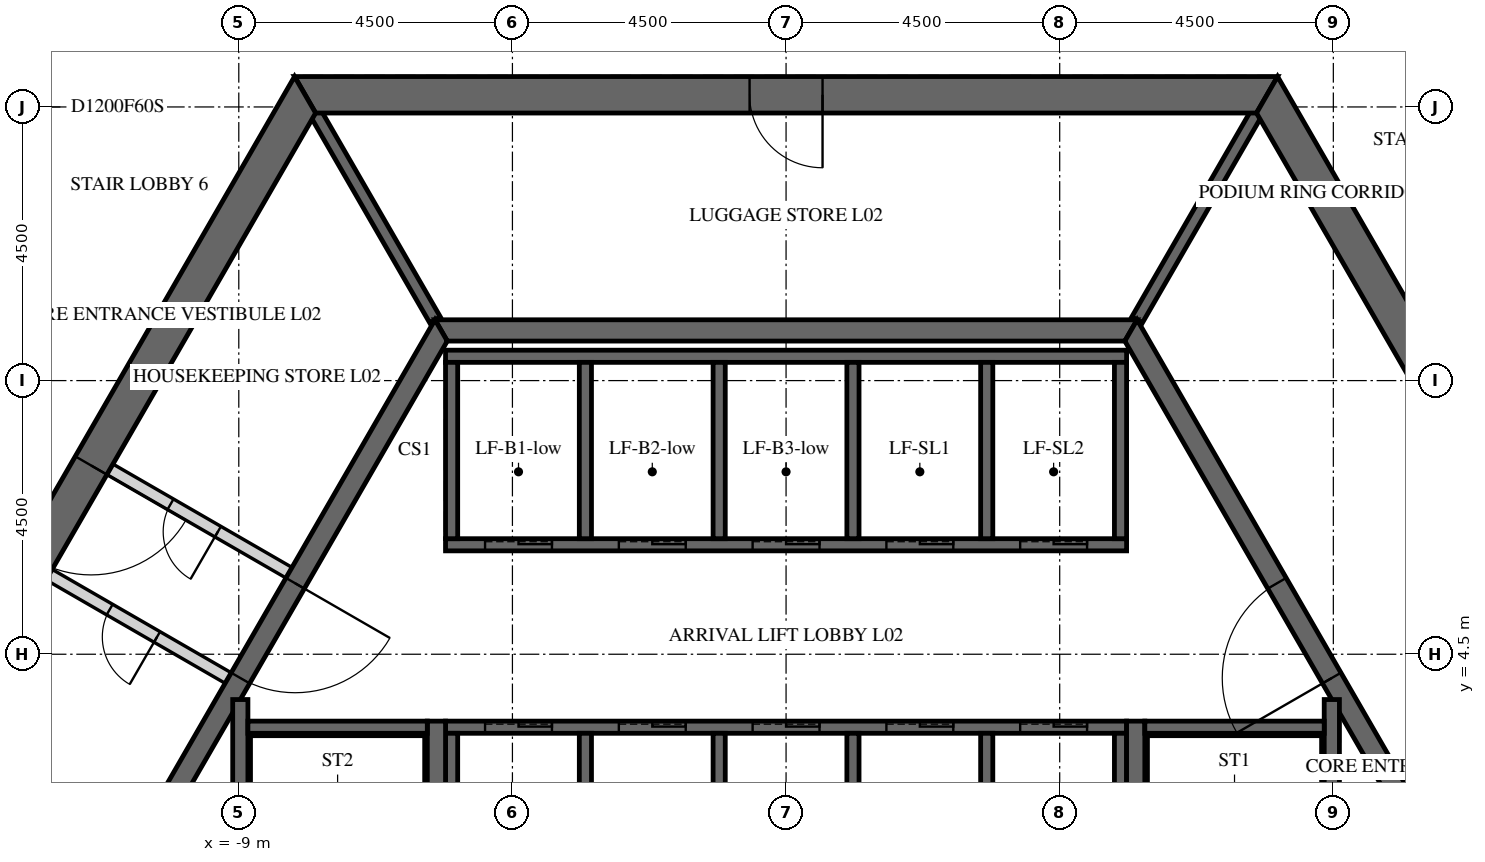
"""IFC4 building model, lengths in metres.
Left out: names, types, materials, properties, quantities, classifications, styles, units other than length and angle.
Written with IfcOpenShell. Run it as: python <this file> out.ifc"""

import sys

from ifc_helpers import new_model, si_unit, direction, frame, frame_2d, origin, place, context, subcontext, project, spatial, polyline, rectangle, outline, extrude, element, fill, save


model = new_model("IFC4")
c1 = context("Model", 3, precision=1e-05, world=origin(), true_north=direction((0.0, 1.0)))
c2 = subcontext(c1, "Body", "Model", "MODEL_VIEW")
j1 = project(units=[si_unit("LENGTHUNIT", "METRE"), si_unit("PLANEANGLEUNIT", "RADIAN")], contexts=[c1])
p1 = place(None, origin())
s1 = spatial("IfcSite", under=j1, at=p1, CompositionType="ELEMENT")
p2 = place(p1, origin())
s2 = spatial("IfcBuilding", under=s1, at=p2, CompositionType="ELEMENT")
p3 = place(p2, frame((0.0, 0.0, 15.0)))
s3 = spatial("IfcBuildingStorey", under=s2, at=p3, CompositionType="ELEMENT", Elevation=15.0)
p4 = place(p3, frame((-7.91, 13.7, -0.25), z_axis=(0.0, 0.0, 1.0), x_axis=(-0.499999880136, -0.866025472988, 0.0)))
e1 = element("IfcWall", 1, at=p4, inside=s3, PredefinedType="SHEAR", context=c2, shape_type="SweptSolid", body=[
    extrude(outline(polyline([(-0.173, -0.3), (15.993, -0.3), (15.646, 0.3), (0.173, 0.3), (-0.173, -0.3)])), origin(), (0.0, 0.0, 1.0), 5.5),
])
p5 = place(p4, frame((7.039, 0.0, 0.25)))
e2 = element("IfcOpeningElement", 2, at=p5, cuts=e1, PredefinedType="OPENING", context=c2, shape_type="SweptSolid", body=[
    extrude(rectangle(XDim=1.8, YDim=2.4, at=frame_2d((0.9, 1.2))), frame((0.0, 0.31, 0.0), z_axis=(0.0, -1.0, 0.0), x_axis=(1.0, 0.0, 0.0)), (0.0, 0.0, 1.0), 0.62),
])
p6 = place(p3, frame((15.819, 0.0, -0.25), z_axis=(0.0, 0.0, 1.0), x_axis=(-0.499999880136, 0.866025472988, 0.0)))
e3 = element("IfcWall", 3, at=p6, inside=s3, PredefinedType="SHEAR", context=c2, shape_type="SweptSolid", body=[
    extrude(outline(polyline([(-0.173, -0.3), (15.993, -0.3), (15.646, 0.3), (0.173, 0.3), (-0.173, -0.3)])), origin(), (0.0, 0.0, 1.0), 5.5),
])
p7 = place(p6, frame((6.981, 0.0, 0.25)))
e4 = element("IfcOpeningElement", 4, at=p7, cuts=e3, PredefinedType="OPENING", context=c2, shape_type="SweptSolid", body=[
    extrude(rectangle(XDim=1.8, YDim=2.4, at=frame_2d((0.9, 1.2))), frame((0.0, 0.31, 0.0), z_axis=(0.0, -1.0, 0.0), x_axis=(1.0, 0.0, 0.0)), (0.0, 0.0, 1.0), 0.62),
])
p8 = place(p3, frame((7.91, 13.7, -0.25), z_axis=(0.0, 0.0, 1.0), x_axis=(-1.0, 0.0, 0.0)))
e5 = element("IfcWall", 5, at=p8, inside=s3, PredefinedType="SHEAR", context=c2, shape_type="SweptSolid", body=[
    extrude(outline(polyline([(-0.173, -0.3), (15.993, -0.3), (15.646, 0.3), (0.173, 0.3), (-0.173, -0.3)])), origin(), (0.0, 0.0, 1.0), 5.5),
])
p9 = place(p8, frame((7.31, 0.0, 0.25)))
e6 = element("IfcOpeningElement", 6, at=p9, cuts=e5, PredefinedType="OPENING", context=c2, shape_type="SweptSolid", body=[
    extrude(rectangle(XDim=1.2, YDim=2.4, at=frame_2d((0.6, 1.2))), frame((0.0, 0.31, 0.0), z_axis=(0.0, -1.0, 0.0), x_axis=(1.0, 0.0, 0.0)), (0.0, 0.0, 1.0), 0.62),
])
p10 = place(p3, frame((-5.673, 9.825, -0.25), z_axis=(0.0, 0.0, 1.0), x_axis=(-0.499995046907, -0.866028263435, 0.0)))
e7 = element("IfcWall", 7, at=p10, inside=s3, PredefinedType="SHEAR", context=c2, shape_type="SweptSolid", body=[
    extrude(outline(polyline([(-0.101, -0.175), (11.446, -0.175), (11.244, 0.175), (0.101, 0.175), (-0.101, -0.175)])), origin(), (0.0, 0.0, 1.0), 5.5),
])
p11 = place(p10, frame((4.801, 0.0, 0.25)))
e8 = element("IfcOpeningElement", 8, at=p11, cuts=e7, PredefinedType="OPENING", context=c2, shape_type="SweptSolid", body=[
    extrude(rectangle(XDim=1.8, YDim=2.4, at=frame_2d((0.9, 1.2))), frame((0.0, 0.185, 0.0), z_axis=(0.0, -1.0, 0.0), x_axis=(1.0, 0.0, 0.0)), (0.0, 0.0, 1.0), 0.37),
])
p12 = place(p3, frame((11.345, 0.0, -0.25), z_axis=(0.0, 0.0, 1.0), x_axis=(-0.499995046907, 0.866028263435, 0.0)))
e9 = element("IfcWall", 9, at=p12, inside=s3, PredefinedType="SHEAR", context=c2, shape_type="SweptSolid", body=[
    extrude(outline(polyline([(-0.101, -0.175), (11.446, -0.175), (11.244, 0.175), (0.101, 0.175), (-0.101, -0.175)])), origin(), (0.0, 0.0, 1.0), 5.5),
])
p13 = place(p12, frame((4.744, 0.0, 0.25)))
e10 = element("IfcOpeningElement", 10, at=p13, cuts=e9, PredefinedType="OPENING", context=c2, shape_type="SweptSolid", body=[
    extrude(rectangle(XDim=1.8, YDim=2.4, at=frame_2d((0.9, 1.2))), frame((0.0, 0.185, 0.0), z_axis=(0.0, -1.0, 0.0), x_axis=(1.0, 0.0, 0.0)), (0.0, 0.0, 1.0), 0.37),
])
p14 = place(p3, frame((5.673, 9.825, -0.25), z_axis=(0.0, 0.0, 1.0), x_axis=(-1.0, 0.0, 0.0)))
e11 = element("IfcWall", 11, at=p14, inside=s3, PredefinedType="SHEAR", context=c2, shape_type="SweptSolid", body=[
    extrude(outline(polyline([(-0.101, -0.175), (11.446, -0.175), (11.244, 0.175), (0.101, 0.175), (-0.101, -0.175)])), origin(), (0.0, 0.0, 1.0), 5.5),
])
p15 = place(p3, frame((-5.6, 6.3, -0.25), z_axis=(0.0, 0.0, 1.0), x_axis=(1.0, 0.0, 0.0)))
e12 = element("IfcWall", 12, at=p15, inside=s3, PredefinedType="SHEAR", context=c2, shape_type="SweptSolid", body=[
    extrude(rectangle(XDim=11.2, YDim=0.2, at=frame_2d((5.6, 0.0))), origin(), (0.0, 0.0, 1.0), 5.5),
])
p16 = place(p15, frame((0.65, 0.0, 0.25)))
e13 = element("IfcOpeningElement", 13, at=p16, cuts=e12, PredefinedType="OPENING", context=c2, shape_type="SweptSolid", body=[
    extrude(rectangle(XDim=1.1, YDim=2.1, at=frame_2d((0.55, 1.05))), frame((0.0, 0.11, 0.0), z_axis=(0.0, -1.0, 0.0), x_axis=(1.0, 0.0, 0.0)), (0.0, 0.0, 1.0), 0.22),
])
p17 = place(p15, frame((2.85, 0.0, 0.25)))
e14 = element("IfcOpeningElement", 14, at=p17, cuts=e12, PredefinedType="OPENING", context=c2, shape_type="SweptSolid", body=[
    extrude(rectangle(XDim=1.1, YDim=2.1, at=frame_2d((0.55, 1.05))), frame((0.0, 0.11, 0.0), z_axis=(0.0, -1.0, 0.0), x_axis=(1.0, 0.0, 0.0)), (0.0, 0.0, 1.0), 0.22),
])
p18 = place(p15, frame((5.05, 0.0, 0.25)))
e15 = element("IfcOpeningElement", 15, at=p18, cuts=e12, PredefinedType="OPENING", context=c2, shape_type="SweptSolid", body=[
    extrude(rectangle(XDim=1.1, YDim=2.1, at=frame_2d((0.55, 1.05))), frame((0.0, 0.11, 0.0), z_axis=(0.0, -1.0, 0.0), x_axis=(1.0, 0.0, 0.0)), (0.0, 0.0, 1.0), 0.22),
])
p19 = place(p15, frame((7.25, 0.0, 0.25)))
e16 = element("IfcOpeningElement", 16, at=p19, cuts=e12, PredefinedType="OPENING", context=c2, shape_type="SweptSolid", body=[
    extrude(rectangle(XDim=1.1, YDim=2.1, at=frame_2d((0.55, 1.05))), frame((0.0, 0.11, 0.0), z_axis=(0.0, -1.0, 0.0), x_axis=(1.0, 0.0, 0.0)), (0.0, 0.0, 1.0), 0.22),
])
p20 = place(p15, frame((9.45, 0.0, 0.25)))
e17 = element("IfcOpeningElement", 17, at=p20, cuts=e12, PredefinedType="OPENING", context=c2, shape_type="SweptSolid", body=[
    extrude(rectangle(XDim=1.1, YDim=2.1, at=frame_2d((0.55, 1.05))), frame((0.0, 0.11, 0.0), z_axis=(0.0, -1.0, 0.0), x_axis=(1.0, 0.0, 0.0)), (0.0, 0.0, 1.0), 0.22),
])
p21 = place(p3, frame((-5.6, 9.4, -0.25), z_axis=(0.0, 0.0, 1.0), x_axis=(1.0, 0.0, 0.0)))
e18 = element("IfcWall", 18, at=p21, inside=s3, PredefinedType="SHEAR", context=c2, shape_type="SweptSolid", body=[
    extrude(rectangle(XDim=11.2, YDim=0.2, at=frame_2d((5.6, 0.0))), origin(), (0.0, 0.0, 1.0), 5.5),
])
for number, where, z_axis, x_axis in (
    (19, (-5.5, 6.4, -0.25), (0.0, 0.0, 1.0), (0.0, 1.0, 0.0)),
    (20, (-3.3, 6.4, -0.25), (0.0, 0.0, 1.0), (0.0, 1.0, 0.0)),
    (21, (-1.1, 6.4, -0.25), (0.0, 0.0, 1.0), (0.0, 1.0, 0.0)),
    (22, (1.1, 6.4, -0.25), (0.0, 0.0, 1.0), (0.0, 1.0, 0.0)),
    (23, (3.3, 6.4, -0.25), (0.0, 0.0, 1.0), (0.0, 1.0, 0.0)),
    (24, (5.5, 6.4, -0.25), (0.0, 0.0, 1.0), (0.0, 1.0, 0.0)),
):
    element("IfcWall", number, at=place(p3, frame(where, z_axis=z_axis, x_axis=x_axis)), inside=s3, PredefinedType="SHEAR", context=c2, shape_type="SweptSolid", body=[
        extrude(rectangle(XDim=2.9, YDim=0.2, at=frame_2d((1.45, 0.0))), origin(), (0.0, 0.0, 1.0), 5.5),
    ])
p22 = place(p3, frame((-5.6, 3.3, -0.25), z_axis=(0.0, 0.0, 1.0), x_axis=(1.0, 0.0, 0.0)))
e25 = element("IfcWall", 25, at=p22, inside=s3, PredefinedType="SHEAR", context=c2, shape_type="SweptSolid", body=[
    extrude(rectangle(XDim=11.2, YDim=0.2, at=frame_2d((5.6, 0.0))), origin(), (0.0, 0.0, 1.0), 5.5),
])
p23 = place(p22, frame((0.65, 0.0, 0.25)))
e26 = element("IfcOpeningElement", 26, at=p23, cuts=e25, PredefinedType="OPENING", context=c2, shape_type="SweptSolid", body=[
    extrude(rectangle(XDim=1.1, YDim=2.1, at=frame_2d((0.55, 1.05))), frame((0.0, 0.11, 0.0), z_axis=(0.0, -1.0, 0.0), x_axis=(1.0, 0.0, 0.0)), (0.0, 0.0, 1.0), 0.22),
])
p24 = place(p22, frame((2.85, 0.0, 0.25)))
e27 = element("IfcOpeningElement", 27, at=p24, cuts=e25, PredefinedType="OPENING", context=c2, shape_type="SweptSolid", body=[
    extrude(rectangle(XDim=1.1, YDim=2.1, at=frame_2d((0.55, 1.05))), frame((0.0, 0.11, 0.0), z_axis=(0.0, -1.0, 0.0), x_axis=(1.0, 0.0, 0.0)), (0.0, 0.0, 1.0), 0.22),
])
p25 = place(p22, frame((5.05, 0.0, 0.25)))
e28 = element("IfcOpeningElement", 28, at=p25, cuts=e25, PredefinedType="OPENING", context=c2, shape_type="SweptSolid", body=[
    extrude(rectangle(XDim=1.1, YDim=2.1, at=frame_2d((0.55, 1.05))), frame((0.0, 0.11, 0.0), z_axis=(0.0, -1.0, 0.0), x_axis=(1.0, 0.0, 0.0)), (0.0, 0.0, 1.0), 0.22),
])
p26 = place(p22, frame((7.25, 0.0, 0.25)))
e29 = element("IfcOpeningElement", 29, at=p26, cuts=e25, PredefinedType="OPENING", context=c2, shape_type="SweptSolid", body=[
    extrude(rectangle(XDim=1.1, YDim=2.1, at=frame_2d((0.55, 1.05))), frame((0.0, 0.11, 0.0), z_axis=(0.0, -1.0, 0.0), x_axis=(1.0, 0.0, 0.0)), (0.0, 0.0, 1.0), 0.22),
])
p27 = place(p22, frame((9.45, 0.0, 0.25)))
e30 = element("IfcOpeningElement", 30, at=p27, cuts=e25, PredefinedType="OPENING", context=c2, shape_type="SweptSolid", body=[
    extrude(rectangle(XDim=1.1, YDim=2.1, at=frame_2d((0.55, 1.05))), frame((0.0, 0.11, 0.0), z_axis=(0.0, -1.0, 0.0), x_axis=(1.0, 0.0, 0.0)), (0.0, 0.0, 1.0), 0.22),
])
for number, where, z_axis, x_axis in (
    (31, (-5.5, 0.1, -0.25), (0.0, 0.0, 1.0), (0.0, 1.0, 0.0)),
    (32, (-3.3, 0.1, -0.25), (0.0, 0.0, 1.0), (0.0, 1.0, 0.0)),
    (33, (-1.1, 0.1, -0.25), (0.0, 0.0, 1.0), (0.0, 1.0, 0.0)),
    (34, (1.1, 0.1, -0.25), (0.0, 0.0, 1.0), (0.0, 1.0, 0.0)),
    (35, (3.3, 0.1, -0.25), (0.0, 0.0, 1.0), (0.0, 1.0, 0.0)),
    (36, (5.5, 0.1, -0.25), (0.0, 0.0, 1.0), (0.0, 1.0, 0.0)),
):
    element("IfcWall", number, at=place(p3, frame(where, z_axis=z_axis, x_axis=x_axis)), inside=s3, PredefinedType="SHEAR", context=c2, shape_type="SweptSolid", body=[
        extrude(rectangle(XDim=3.1, YDim=0.2, at=frame_2d((1.55, 0.0))), origin(), (0.0, 0.0, 1.0), 5.5),
    ])
for number, where, z_axis, x_axis in (
    (37, (5.773, 10.0, -0.25), (0.0, 0.0, 1.0), (0.5, 0.866, 0.0)),
    (38, (-5.773, 10.0, -0.25), (0.0, 0.0, 1.0), (-0.5, 0.866, 0.0)),
):
    element("IfcWall", number, at=place(p3, frame(where, z_axis=z_axis, x_axis=x_axis)), inside=s3, PredefinedType="SHEAR", context=c2, shape_type="SweptSolid", body=[
        extrude(rectangle(XDim=3.926, YDim=0.2, at=frame_2d((1.963, 0.0))), origin(), (0.0, 0.0, 1.0), 5.5),
    ])
p28 = place(p3, frame((-9.175, 4.109, 0.0), z_axis=(0.0, 0.0, 1.0), x_axis=(-0.865989465428, 0.500062241894, 0.0)))
e39 = element("IfcWall", 39, at=p28, inside=s3, PredefinedType="PARTITIONING", context=c2, shape_type="SweptSolid", body=[
    extrude(rectangle(XDim=3.4, YDim=0.2, at=frame_2d((1.7, 0.0))), origin(), (0.0, 0.0, 1.0), 5.25),
])
p29 = place(p28, frame((1.351, 0.0, 0.0)))
e40 = element("IfcOpeningElement", 40, at=p29, cuts=e39, PredefinedType="OPENING", context=c2, shape_type="SweptSolid", body=[
    extrude(rectangle(XDim=0.9, YDim=2.1, at=frame_2d((0.45, 1.05))), frame((0.0, 0.11, 0.0), z_axis=(0.0, -1.0, 0.0), x_axis=(1.0, 0.0, 0.0)), (0.0, 0.0, 1.0), 0.22),
])
p30 = place(p3, frame((-8.175, 5.841, 0.0), z_axis=(0.0, 0.0, 1.0), x_axis=(-0.866020560687, 0.500008388397, 0.0)))
e41 = element("IfcWall", 41, at=p30, inside=s3, PredefinedType="PARTITIONING", context=c2, shape_type="SweptSolid", body=[
    extrude(rectangle(XDim=3.4, YDim=0.2, at=frame_2d((1.7, 0.0))), origin(), (0.0, 0.0, 1.0), 5.25),
])
p31 = place(p30, frame((1.35, 0.0, 0.0)))
e42 = element("IfcOpeningElement", 42, at=p31, cuts=e41, PredefinedType="OPENING", context=c2, shape_type="SweptSolid", body=[
    extrude(rectangle(XDim=0.9, YDim=2.1, at=frame_2d((0.45, 1.05))), frame((0.0, 0.11, 0.0), z_axis=(0.0, -1.0, 0.0), x_axis=(1.0, 0.0, 0.0)), (0.0, 0.0, 1.0), 0.22),
])
p32 = place(p3, frame((5.75, -3.4, -0.25), z_axis=(0.0, 0.0, 1.0), x_axis=(0.0, 1.0, 0.0)))
e43 = element("IfcWall", 43, at=p32, inside=s3, PredefinedType="SHEAR", context=c2, shape_type="SweptSolid", body=[
    extrude(rectangle(XDim=6.8, YDim=0.3, at=frame_2d((3.4, 0.0))), origin(), (0.0, 0.0, 1.0), 5.5),
])
p33 = place(p3, frame((8.975, -3.755, -0.25), z_axis=(0.0, 0.0, 1.0), x_axis=(0.0, 1.0, 0.0)))
e44 = element("IfcWall", 44, at=p33, inside=s3, PredefinedType="SHEAR", context=c2, shape_type="SweptSolid", body=[
    extrude(rectangle(XDim=7.51, YDim=0.25, at=frame_2d((3.755, 0.0))), origin(), (0.0, 0.0, 1.0), 5.5),
])
p34 = place(p3, frame((5.9, 3.3, -0.25), z_axis=(0.0, 0.0, 1.0), x_axis=(1.0, 0.0, 0.0)))
e45 = element("IfcWall", 45, at=p34, inside=s3, PredefinedType="SHEAR", context=c2, shape_type="SweptSolid", body=[
    extrude(rectangle(XDim=2.95, YDim=0.2, at=frame_2d((1.475, 0.0))), origin(), (0.0, 0.0, 1.0), 5.5),
])
p35 = place(p3, frame((-5.75, -3.4, -0.25), z_axis=(0.0, 0.0, 1.0), x_axis=(0.0, 1.0, 0.0)))
e46 = element("IfcWall", 46, at=p35, inside=s3, PredefinedType="SHEAR", context=c2, shape_type="SweptSolid", body=[
    extrude(rectangle(XDim=6.8, YDim=0.3, at=frame_2d((3.4, 0.0))), origin(), (0.0, 0.0, 1.0), 5.5),
])
p36 = place(p3, frame((-8.975, -3.755, -0.25), z_axis=(0.0, 0.0, 1.0), x_axis=(0.0, 1.0, 0.0)))
e47 = element("IfcWall", 47, at=p36, inside=s3, PredefinedType="SHEAR", context=c2, shape_type="SweptSolid", body=[
    extrude(rectangle(XDim=7.51, YDim=0.25, at=frame_2d((3.755, 0.0))), origin(), (0.0, 0.0, 1.0), 5.5),
])
p37 = place(p3, frame((-8.85, 3.3, -0.25), z_axis=(0.0, 0.0, 1.0), x_axis=(1.0, 0.0, 0.0)))
e48 = element("IfcWall", 48, at=p37, inside=s3, PredefinedType="SHEAR", context=c2, shape_type="SweptSolid", body=[
    extrude(rectangle(XDim=2.95, YDim=0.2, at=frame_2d((1.475, 0.0))), origin(), (0.0, 0.0, 1.0), 5.5),
])
p38 = place(p5, origin())
e49 = element("IfcDoor", 49, at=p38, inside=s3, OperationType="DOUBLE_DOOR_SINGLE_SWING", PredefinedType="DOOR", context=c2, shape_type="SweptSolid", body=[
    extrude(rectangle(XDim=1.8, YDim=2.4, at=frame_2d((0.9, 1.2))), frame((0.0, 0.025, 0.0), z_axis=(0.0, -1.0, 0.0), x_axis=(1.0, 0.0, 0.0)), (0.0, 0.0, 1.0), 0.05),
])
fill(e2, e49)
p39 = place(p9, origin())
e50 = element("IfcDoor", 50, at=p39, inside=s3, OperationType="SINGLE_SWING_LEFT", PredefinedType="DOOR", context=c2, shape_type="SweptSolid", body=[
    extrude(rectangle(XDim=1.2, YDim=2.4, at=frame_2d((0.6, 1.2))), frame((0.0, 0.025, 0.0), z_axis=(0.0, -1.0, 0.0), x_axis=(1.0, 0.0, 0.0)), (0.0, 0.0, 1.0), 0.05),
])
fill(e6, e50)
p40 = place(p11, origin())
e51 = element("IfcDoor", 51, at=p40, inside=s3, OperationType="DOUBLE_DOOR_SINGLE_SWING", PredefinedType="DOOR", context=c2, shape_type="SweptSolid", body=[
    extrude(rectangle(XDim=1.8, YDim=2.4, at=frame_2d((0.9, 1.2))), frame((0.0, 0.025, 0.0), z_axis=(0.0, -1.0, 0.0), x_axis=(1.0, 0.0, 0.0)), (0.0, 0.0, 1.0), 0.05),
])
fill(e8, e51)
p41 = place(p13, origin())
e52 = element("IfcDoor", 52, at=p41, inside=s3, OperationType="DOUBLE_DOOR_SINGLE_SWING", PredefinedType="DOOR", context=c2, shape_type="SweptSolid", body=[
    extrude(rectangle(XDim=1.8, YDim=2.4, at=frame_2d((0.9, 1.2))), frame((0.0, 0.025, 0.0), z_axis=(0.0, -1.0, 0.0), x_axis=(1.0, 0.0, 0.0)), (0.0, 0.0, 1.0), 0.05),
])
fill(e10, e52)
p42 = place(p29, origin())
e53 = element("IfcDoor", 53, at=p42, inside=s3, OperationType="SINGLE_SWING_LEFT", PredefinedType="DOOR", context=c2, shape_type="SweptSolid", body=[
    extrude(rectangle(XDim=0.9, YDim=2.1, at=frame_2d((0.45, 1.05))), frame((0.0, 0.025, 0.0), z_axis=(0.0, -1.0, 0.0), x_axis=(1.0, 0.0, 0.0)), (0.0, 0.0, 1.0), 0.05),
])
fill(e40, e53)
p43 = place(p31, origin())
e54 = element("IfcDoor", 54, at=p43, inside=s3, OperationType="SINGLE_SWING_LEFT", PredefinedType="DOOR", context=c2, shape_type="SweptSolid", body=[
    extrude(rectangle(XDim=0.9, YDim=2.1, at=frame_2d((0.45, 1.05))), frame((0.0, 0.025, 0.0), z_axis=(0.0, -1.0, 0.0), x_axis=(1.0, 0.0, 0.0)), (0.0, 0.0, 1.0), 0.05),
])
fill(e42, e54)
p44 = place(p16, origin())
e55 = element("IfcDoor", 55, at=p44, inside=s3, OperationType="SLIDING_TO_LEFT", PredefinedType="DOOR", context=c2, shape_type="SweptSolid", body=[
    extrude(rectangle(XDim=1.1, YDim=2.1, at=frame_2d((0.55, 1.05))), frame((0.0, 0.025, 0.0), z_axis=(0.0, -1.0, 0.0), x_axis=(1.0, 0.0, 0.0)), (0.0, 0.0, 1.0), 0.05),
])
fill(e13, e55)
p45 = place(p17, origin())
e56 = element("IfcDoor", 56, at=p45, inside=s3, OperationType="SLIDING_TO_LEFT", PredefinedType="DOOR", context=c2, shape_type="SweptSolid", body=[
    extrude(rectangle(XDim=1.1, YDim=2.1, at=frame_2d((0.55, 1.05))), frame((0.0, 0.025, 0.0), z_axis=(0.0, -1.0, 0.0), x_axis=(1.0, 0.0, 0.0)), (0.0, 0.0, 1.0), 0.05),
])
fill(e14, e56)
p46 = place(p18, origin())
e57 = element("IfcDoor", 57, at=p46, inside=s3, OperationType="SLIDING_TO_LEFT", PredefinedType="DOOR", context=c2, shape_type="SweptSolid", body=[
    extrude(rectangle(XDim=1.1, YDim=2.1, at=frame_2d((0.55, 1.05))), frame((0.0, 0.025, 0.0), z_axis=(0.0, -1.0, 0.0), x_axis=(1.0, 0.0, 0.0)), (0.0, 0.0, 1.0), 0.05),
])
fill(e15, e57)
p47 = place(p19, origin())
e58 = element("IfcDoor", 58, at=p47, inside=s3, OperationType="SLIDING_TO_LEFT", PredefinedType="DOOR", context=c2, shape_type="SweptSolid", body=[
    extrude(rectangle(XDim=1.1, YDim=2.1, at=frame_2d((0.55, 1.05))), frame((0.0, 0.025, 0.0), z_axis=(0.0, -1.0, 0.0), x_axis=(1.0, 0.0, 0.0)), (0.0, 0.0, 1.0), 0.05),
])
fill(e16, e58)
p48 = place(p20, origin())
e59 = element("IfcDoor", 59, at=p48, inside=s3, OperationType="SLIDING_TO_LEFT", PredefinedType="DOOR", context=c2, shape_type="SweptSolid", body=[
    extrude(rectangle(XDim=1.1, YDim=2.1, at=frame_2d((0.55, 1.05))), frame((0.0, 0.025, 0.0), z_axis=(0.0, -1.0, 0.0), x_axis=(1.0, 0.0, 0.0)), (0.0, 0.0, 1.0), 0.05),
])
fill(e17, e59)
p49 = place(p23, origin())
e60 = element("IfcDoor", 60, at=p49, inside=s3, OperationType="SLIDING_TO_LEFT", PredefinedType="DOOR", context=c2, shape_type="SweptSolid", body=[
    extrude(rectangle(XDim=1.1, YDim=2.1, at=frame_2d((0.55, 1.05))), frame((0.0, 0.025, 0.0), z_axis=(0.0, -1.0, 0.0), x_axis=(1.0, 0.0, 0.0)), (0.0, 0.0, 1.0), 0.05),
])
fill(e26, e60)
p50 = place(p24, origin())
e61 = element("IfcDoor", 61, at=p50, inside=s3, OperationType="SLIDING_TO_LEFT", PredefinedType="DOOR", context=c2, shape_type="SweptSolid", body=[
    extrude(rectangle(XDim=1.1, YDim=2.1, at=frame_2d((0.55, 1.05))), frame((0.0, 0.025, 0.0), z_axis=(0.0, -1.0, 0.0), x_axis=(1.0, 0.0, 0.0)), (0.0, 0.0, 1.0), 0.05),
])
fill(e27, e61)
p51 = place(p25, origin())
e62 = element("IfcDoor", 62, at=p51, inside=s3, OperationType="SLIDING_TO_LEFT", PredefinedType="DOOR", context=c2, shape_type="SweptSolid", body=[
    extrude(rectangle(XDim=1.1, YDim=2.1, at=frame_2d((0.55, 1.05))), frame((0.0, 0.025, 0.0), z_axis=(0.0, -1.0, 0.0), x_axis=(1.0, 0.0, 0.0)), (0.0, 0.0, 1.0), 0.05),
])
fill(e28, e62)
p52 = place(p26, origin())
e63 = element("IfcDoor", 63, at=p52, inside=s3, OperationType="SLIDING_TO_LEFT", PredefinedType="DOOR", context=c2, shape_type="SweptSolid", body=[
    extrude(rectangle(XDim=1.1, YDim=2.1, at=frame_2d((0.55, 1.05))), frame((0.0, 0.025, 0.0), z_axis=(0.0, -1.0, 0.0), x_axis=(1.0, 0.0, 0.0)), (0.0, 0.0, 1.0), 0.05),
])
fill(e29, e63)
p53 = place(p27, origin())
e64 = element("IfcDoor", 64, at=p53, inside=s3, OperationType="SLIDING_TO_LEFT", PredefinedType="DOOR", context=c2, shape_type="SweptSolid", body=[
    extrude(rectangle(XDim=1.1, YDim=2.1, at=frame_2d((0.55, 1.05))), frame((0.0, 0.025, 0.0), z_axis=(0.0, -1.0, 0.0), x_axis=(1.0, 0.0, 0.0)), (0.0, 0.0, 1.0), 0.05),
])
fill(e30, e64)
save(model, sys.argv[1])
